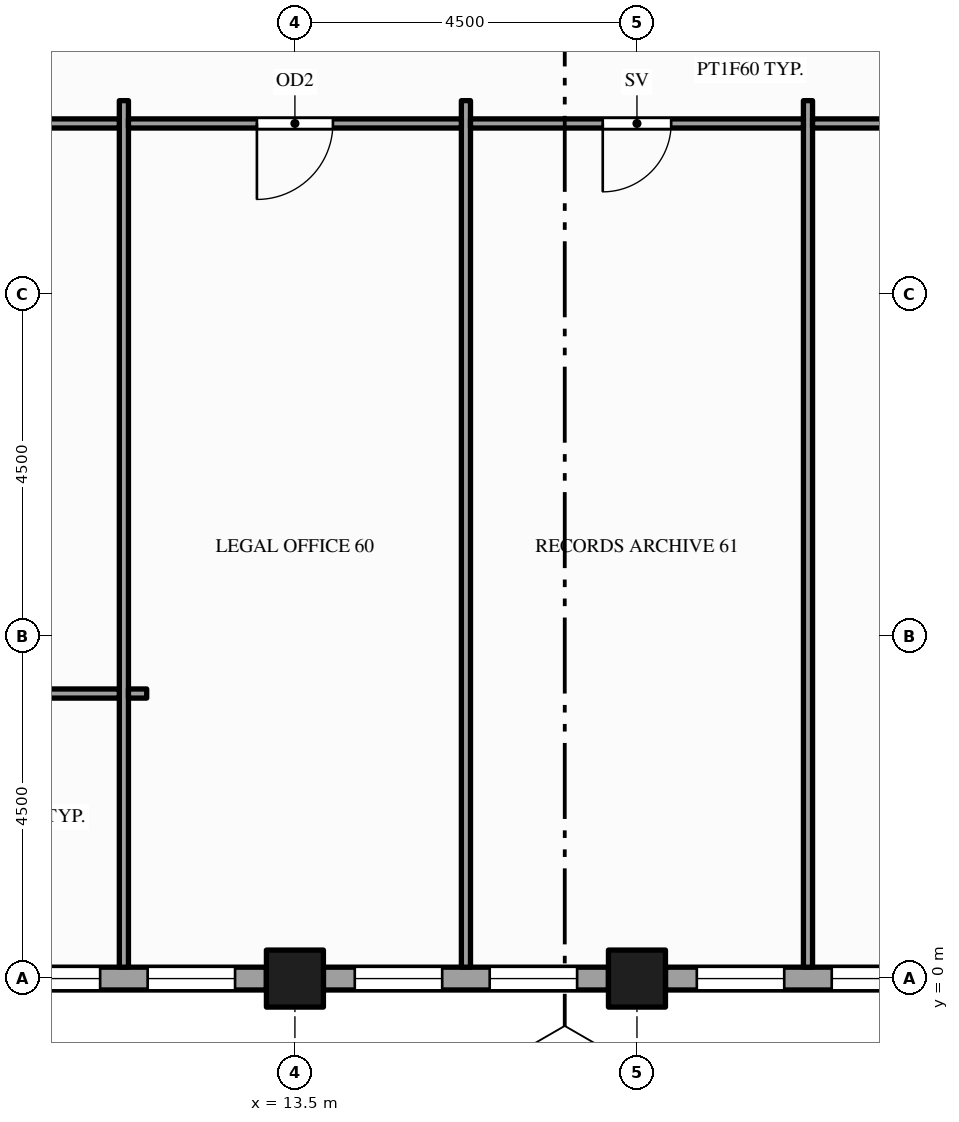
"""IFC4 building model, lengths in metres.
Left out: names, types, materials, properties, quantities, classifications, styles, units other than length and angle.
Written with IfcOpenShell. Run it as: python <this file> out.ifc"""

import sys

from ifc_helpers import new_model, si_unit, direction, frame, frame_2d, origin, origin_2d, place, context, subcontext, project, spatial, rectangle, hollow_rectangle, extrude, element, fill, save


model = new_model("IFC4")
c1 = context("Model", 3, precision=1e-05, world=origin(), true_north=direction((0.0, 1.0)))
c2 = subcontext(c1, "Body", "Model", "MODEL_VIEW")
j1 = project(units=[si_unit("LENGTHUNIT", "METRE"), si_unit("PLANEANGLEUNIT", "RADIAN")], contexts=[c1])
p1 = place(None, origin())
s1 = spatial("IfcSite", under=j1, at=p1, CompositionType="ELEMENT")
p2 = place(p1, origin())
s2 = spatial("IfcBuilding", under=s1, at=p2, CompositionType="ELEMENT")
p3 = place(p2, frame((0.0, 0.0, 239.0)))
s3 = spatial("IfcBuildingStorey", under=s2, at=p3, CompositionType="ELEMENT", Elevation=239.0)
for number, where, z_axis, x_axis in (
    (1, (13.5, 0.0, -0.15), (0.0, 0.0, 1.0), (1.0, 0.0, 0.0)),
    (2, (18.0, 0.0, -0.15), (0.0, 0.0, 1.0), (1.0, 0.0, 0.0)),
):
    element("IfcColumn", number, at=place(p3, frame(where, z_axis=z_axis, x_axis=x_axis)), inside=s3, PredefinedType="COLUMN", context=c2, shape_type="SweptSolid", body=[
        extrude(hollow_rectangle(XDim=0.75, YDim=0.75, WallThickness=0.036, at=origin_2d()), origin(), (0.0, 0.0, 1.0), 3.9),
    ])
p4 = place(p3, frame((9.375, 0.0, 0.0), z_axis=(0.0, 0.0, 1.0), x_axis=(1.0, 0.0, 0.0)))
e3 = element("IfcWall", 3, at=p4, inside=s3, PredefinedType="STANDARD", context=c2, shape_type="SweptSolid", body=[
    extrude(rectangle(XDim=3.75, YDim=0.3, at=frame_2d((1.875, 0.0))), origin(), (0.0, 0.0, 1.0), 3.057),
])
p5 = place(p4, frame((0.413, 0.0, 0.9)))
e4 = element("IfcOpeningElement", 4, at=p5, cuts=e3, PredefinedType="OPENING", context=c2, shape_type="SweptSolid", body=[
    extrude(rectangle(XDim=1.15, YDim=2.0, at=frame_2d((0.575, 1.0))), frame((0.0, 0.16, 0.0), z_axis=(0.0, -1.0, 0.0), x_axis=(1.0, 0.0, 0.0)), (0.0, 0.0, 1.0), 0.32),
])
p6 = place(p4, frame((2.188, 0.0, 0.9)))
e5 = element("IfcOpeningElement", 5, at=p6, cuts=e3, PredefinedType="OPENING", context=c2, shape_type="SweptSolid", body=[
    extrude(rectangle(XDim=1.15, YDim=2.0, at=frame_2d((0.575, 1.0))), frame((0.0, 0.16, 0.0), z_axis=(0.0, -1.0, 0.0), x_axis=(1.0, 0.0, 0.0)), (0.0, 0.0, 1.0), 0.32),
])
p7 = place(p3, frame((13.875, 0.0, 0.0), z_axis=(0.0, 0.0, 1.0), x_axis=(1.0, 0.0, 0.0)))
e6 = element("IfcWall", 6, at=p7, inside=s3, PredefinedType="STANDARD", context=c2, shape_type="SweptSolid", body=[
    extrude(rectangle(XDim=3.75, YDim=0.3, at=frame_2d((1.875, 0.0))), origin(), (0.0, 0.0, 1.0), 3.057),
])
p8 = place(p7, frame((0.413, 0.0, 0.9)))
e7 = element("IfcOpeningElement", 7, at=p8, cuts=e6, PredefinedType="OPENING", context=c2, shape_type="SweptSolid", body=[
    extrude(rectangle(XDim=1.15, YDim=2.0, at=frame_2d((0.575, 1.0))), frame((0.0, 0.16, 0.0), z_axis=(0.0, -1.0, 0.0), x_axis=(1.0, 0.0, 0.0)), (0.0, 0.0, 1.0), 0.32),
])
p9 = place(p7, frame((2.188, 0.0, 0.9)))
e8 = element("IfcOpeningElement", 8, at=p9, cuts=e6, PredefinedType="OPENING", context=c2, shape_type="SweptSolid", body=[
    extrude(rectangle(XDim=1.15, YDim=2.0, at=frame_2d((0.575, 1.0))), frame((0.0, 0.16, 0.0), z_axis=(0.0, -1.0, 0.0), x_axis=(1.0, 0.0, 0.0)), (0.0, 0.0, 1.0), 0.32),
])
p10 = place(p3, frame((18.375, 0.0, 0.0), z_axis=(0.0, 0.0, 1.0), x_axis=(1.0, 0.0, 0.0)))
e9 = element("IfcWall", 9, at=p10, inside=s3, PredefinedType="STANDARD", context=c2, shape_type="SweptSolid", body=[
    extrude(rectangle(XDim=3.75, YDim=0.3, at=frame_2d((1.875, 0.0))), origin(), (0.0, 0.0, 1.0), 3.057),
])
p11 = place(p10, frame((0.413, 0.0, 0.9)))
e10 = element("IfcOpeningElement", 10, at=p11, cuts=e9, PredefinedType="OPENING", context=c2, shape_type="SweptSolid", body=[
    extrude(rectangle(XDim=1.15, YDim=2.0, at=frame_2d((0.575, 1.0))), frame((0.0, 0.16, 0.0), z_axis=(0.0, -1.0, 0.0), x_axis=(1.0, 0.0, 0.0)), (0.0, 0.0, 1.0), 0.32),
])
p12 = place(p10, frame((2.188, 0.0, 0.9)))
e11 = element("IfcOpeningElement", 11, at=p12, cuts=e9, PredefinedType="OPENING", context=c2, shape_type="SweptSolid", body=[
    extrude(rectangle(XDim=1.15, YDim=2.0, at=frame_2d((0.575, 1.0))), frame((0.0, 0.16, 0.0), z_axis=(0.0, -1.0, 0.0), x_axis=(1.0, 0.0, 0.0)), (0.0, 0.0, 1.0), 0.32),
])
for number, where, z_axis, x_axis in (
    (12, (11.25, 0.15, 0.0), (0.0, 0.0, 1.0), (0.0, 1.0, 0.0)),
    (13, (15.75, 0.15, 0.0), (0.0, 0.0, 1.0), (0.0, 1.0, 0.0)),
    (14, (20.25, 0.15, 0.0), (0.0, 0.0, 1.0), (0.0, 1.0, 0.0)),
):
    element("IfcWall", number, at=place(p3, frame(where, z_axis=z_axis, x_axis=x_axis)), inside=s3, PredefinedType="PARTITIONING", context=c2, shape_type="SweptSolid", body=[
        extrude(rectangle(XDim=11.4, YDim=0.12, at=frame_2d((5.7, 0.0))), origin(), (0.0, 0.0, 1.0), 2.77),
    ])
p13 = place(p3, frame((9.125, 3.75, 0.0), z_axis=(0.0, 0.0, 1.0), x_axis=(1.0, 0.0, 0.0)))
e15 = element("IfcWall", 15, at=p13, inside=s3, PredefinedType="PARTITIONING", context=c2, shape_type="SweptSolid", body=[
    extrude(rectangle(XDim=2.065, YDim=0.12, at=frame_2d((1.032, 0.0))), origin(), (0.0, 0.0, 1.0), 2.77),
])
p14 = place(p3, frame((11.31, 3.75, 0.0), z_axis=(0.0, 0.0, 1.0), x_axis=(1.0, 0.0, 0.0)))
e16 = element("IfcWall", 16, at=p14, inside=s3, PredefinedType="PARTITIONING", context=c2, shape_type="SweptSolid", body=[
    extrude(rectangle(XDim=0.24, YDim=0.12, at=frame_2d((0.12, 0.0))), origin(), (0.0, 0.0, 1.0), 2.77),
])
p15 = place(p3, frame((0.15, 11.25, 0.0), z_axis=(0.0, 0.0, 1.0), x_axis=(1.0, 0.0, 0.0)))
e17 = element("IfcWall", 17, at=p15, inside=s3, PredefinedType="PARTITIONING", context=c2, shape_type="SweptSolid", body=[
    extrude(rectangle(XDim=11.04, YDim=0.12, at=frame_2d((5.52, 0.0))), origin(), (0.0, 0.0, 1.0), 2.77),
])
p16 = place(p15, frame((4.93, 0.0, 0.0)))
e18 = element("IfcOpeningElement", 18, at=p16, cuts=e17, PredefinedType="OPENING", context=c2, shape_type="SweptSolid", body=[
    extrude(rectangle(XDim=1.2, YDim=2.1, at=frame_2d((0.6, 1.05))), frame((0.0, 0.07, 0.0), z_axis=(0.0, -1.0, 0.0), x_axis=(1.0, 0.0, 0.0)), (0.0, 0.0, 1.0), 0.14),
])
p17 = place(p3, frame((11.31, 11.25, 0.0), z_axis=(0.0, 0.0, 1.0), x_axis=(1.0, 0.0, 0.0)))
e19 = element("IfcWall", 19, at=p17, inside=s3, PredefinedType="PARTITIONING", context=c2, shape_type="SweptSolid", body=[
    extrude(rectangle(XDim=4.38, YDim=0.12, at=frame_2d((2.19, 0.0))), origin(), (0.0, 0.0, 1.0), 2.77),
])
p18 = place(p17, frame((1.69, 0.0, 0.0)))
e20 = element("IfcOpeningElement", 20, at=p18, cuts=e19, PredefinedType="OPENING", context=c2, shape_type="SweptSolid", body=[
    extrude(rectangle(XDim=1.0, YDim=2.1, at=frame_2d((0.5, 1.05))), frame((0.0, 0.07, 0.0), z_axis=(0.0, -1.0, 0.0), x_axis=(1.0, 0.0, 0.0)), (0.0, 0.0, 1.0), 0.14),
])
p19 = place(p3, frame((15.81, 11.25, 0.0), z_axis=(0.0, 0.0, 1.0), x_axis=(1.0, 0.0, 0.0)))
e21 = element("IfcWall", 21, at=p19, inside=s3, PredefinedType="PARTITIONING", context=c2, shape_type="SweptSolid", body=[
    extrude(rectangle(XDim=4.38, YDim=0.12, at=frame_2d((2.19, 0.0))), origin(), (0.0, 0.0, 1.0), 2.77),
])
p20 = place(p19, frame((1.74, 0.0, 0.0)))
e22 = element("IfcOpeningElement", 22, at=p20, cuts=e21, PredefinedType="OPENING", context=c2, shape_type="SweptSolid", body=[
    extrude(rectangle(XDim=0.9, YDim=2.1, at=frame_2d((0.45, 1.05))), frame((0.0, 0.07, 0.0), z_axis=(0.0, -1.0, 0.0), x_axis=(1.0, 0.0, 0.0)), (0.0, 0.0, 1.0), 0.14),
])
p21 = place(p3, frame((20.31, 11.25, 0.0), z_axis=(0.0, 0.0, 1.0), x_axis=(1.0, 0.0, 0.0)))
e23 = element("IfcWall", 23, at=p21, inside=s3, PredefinedType="PARTITIONING", context=c2, shape_type="SweptSolid", body=[
    extrude(rectangle(XDim=4.38, YDim=0.12, at=frame_2d((2.19, 0.0))), origin(), (0.0, 0.0, 1.0), 2.77),
])
p22 = place(p21, frame((1.69, 0.0, 0.0)))
e24 = element("IfcOpeningElement", 24, at=p22, cuts=e23, PredefinedType="OPENING", context=c2, shape_type="SweptSolid", body=[
    extrude(rectangle(XDim=1.0, YDim=2.1, at=frame_2d((0.5, 1.05))), frame((0.0, 0.07, 0.0), z_axis=(0.0, -1.0, 0.0), x_axis=(1.0, 0.0, 0.0)), (0.0, 0.0, 1.0), 0.14),
])
p23 = place(p5, origin())
e25 = element("IfcWindow", 25, at=p23, inside=s3, PartitioningType="SINGLE_PANEL", PredefinedType="WINDOW", context=c2, shape_type="SweptSolid", body=[
    extrude(rectangle(XDim=1.15, YDim=2.0, at=frame_2d((0.575, 1.0))), frame((0.0, 0.03, 0.0), z_axis=(0.0, -1.0, 0.0), x_axis=(1.0, 0.0, 0.0)), (0.0, 0.0, 1.0), 0.06),
])
fill(e4, e25)
p24 = place(p6, origin())
e26 = element("IfcWindow", 26, at=p24, inside=s3, PartitioningType="SINGLE_PANEL", PredefinedType="WINDOW", context=c2, shape_type="SweptSolid", body=[
    extrude(rectangle(XDim=1.15, YDim=2.0, at=frame_2d((0.575, 1.0))), frame((0.0, 0.03, 0.0), z_axis=(0.0, -1.0, 0.0), x_axis=(1.0, 0.0, 0.0)), (0.0, 0.0, 1.0), 0.06),
])
fill(e5, e26)
p25 = place(p8, origin())
e27 = element("IfcWindow", 27, at=p25, inside=s3, PartitioningType="SINGLE_PANEL", PredefinedType="WINDOW", context=c2, shape_type="SweptSolid", body=[
    extrude(rectangle(XDim=1.15, YDim=2.0, at=frame_2d((0.575, 1.0))), frame((0.0, 0.03, 0.0), z_axis=(0.0, -1.0, 0.0), x_axis=(1.0, 0.0, 0.0)), (0.0, 0.0, 1.0), 0.06),
])
fill(e7, e27)
p26 = place(p9, origin())
e28 = element("IfcWindow", 28, at=p26, inside=s3, PartitioningType="SINGLE_PANEL", PredefinedType="WINDOW", context=c2, shape_type="SweptSolid", body=[
    extrude(rectangle(XDim=1.15, YDim=2.0, at=frame_2d((0.575, 1.0))), frame((0.0, 0.03, 0.0), z_axis=(0.0, -1.0, 0.0), x_axis=(1.0, 0.0, 0.0)), (0.0, 0.0, 1.0), 0.06),
])
fill(e8, e28)
p27 = place(p11, origin())
e29 = element("IfcWindow", 29, at=p27, inside=s3, PartitioningType="SINGLE_PANEL", PredefinedType="WINDOW", context=c2, shape_type="SweptSolid", body=[
    extrude(rectangle(XDim=1.15, YDim=2.0, at=frame_2d((0.575, 1.0))), frame((0.0, 0.03, 0.0), z_axis=(0.0, -1.0, 0.0), x_axis=(1.0, 0.0, 0.0)), (0.0, 0.0, 1.0), 0.06),
])
fill(e10, e29)
p28 = place(p12, origin())
e30 = element("IfcWindow", 30, at=p28, inside=s3, PartitioningType="SINGLE_PANEL", PredefinedType="WINDOW", context=c2, shape_type="SweptSolid", body=[
    extrude(rectangle(XDim=1.15, YDim=2.0, at=frame_2d((0.575, 1.0))), frame((0.0, 0.03, 0.0), z_axis=(0.0, -1.0, 0.0), x_axis=(1.0, 0.0, 0.0)), (0.0, 0.0, 1.0), 0.06),
])
fill(e11, e30)
p29 = place(p18, origin())
e31 = element("IfcDoor", 31, at=p29, inside=s3, OperationType="SINGLE_SWING_LEFT", PredefinedType="DOOR", context=c2, shape_type="SweptSolid", body=[
    extrude(rectangle(XDim=1.0, YDim=2.1, at=frame_2d((0.5, 1.05))), frame((0.0, 0.025, 0.0), z_axis=(0.0, -1.0, 0.0), x_axis=(1.0, 0.0, 0.0)), (0.0, 0.0, 1.0), 0.05),
])
fill(e20, e31)
p30 = place(p20, origin())
e32 = element("IfcDoor", 32, at=p30, inside=s3, OperationType="SINGLE_SWING_LEFT", PredefinedType="DOOR", context=c2, shape_type="SweptSolid", body=[
    extrude(rectangle(XDim=0.9, YDim=2.1, at=frame_2d((0.45, 1.05))), frame((0.0, 0.025, 0.0), z_axis=(0.0, -1.0, 0.0), x_axis=(1.0, 0.0, 0.0)), (0.0, 0.0, 1.0), 0.05),
])
fill(e22, e32)
save(model, sys.argv[1])
